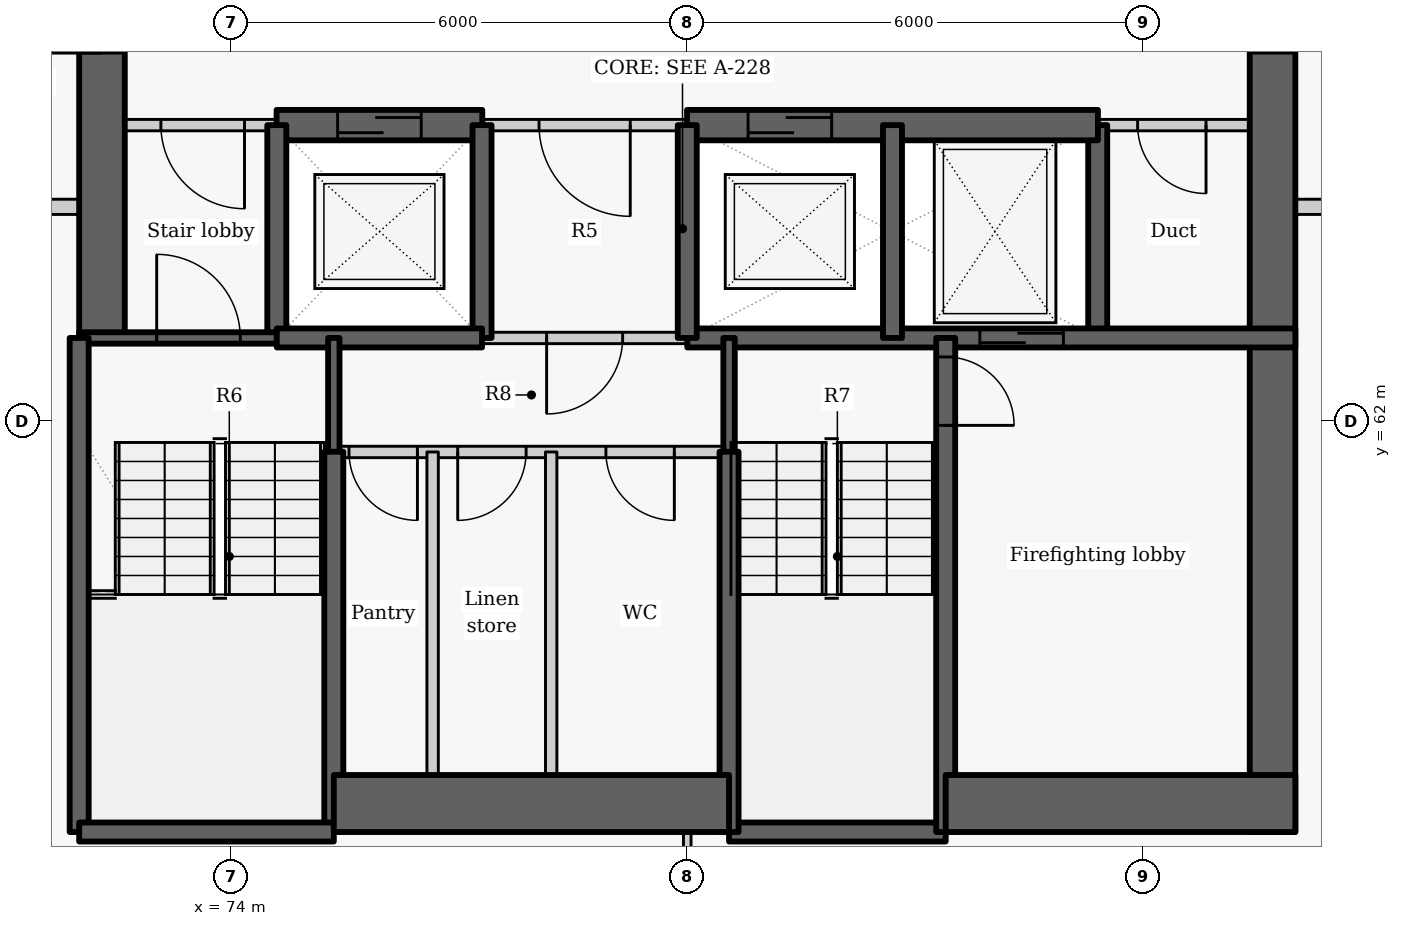
"""IFC4 building model, lengths in metres.
Left out: names, types, materials, properties, quantities, classifications, styles, units other than length and angle.
Written with IfcOpenShell. Run it as: python <this file> out.ifc"""

import sys

from ifc_helpers import new_model, si_unit, direction, frame, frame_2d, origin, place, context, subcontext, project, spatial, rectangle, extrude, element, fill, save


model = new_model("IFC4")
c1 = context("Model", 3, precision=1e-05, world=origin(), true_north=direction((0.0, 1.0)))
c2 = subcontext(c1, "Body", "Model", "MODEL_VIEW")
j1 = project(units=[si_unit("LENGTHUNIT", "METRE"), si_unit("PLANEANGLEUNIT", "RADIAN")], contexts=[c1])
p1 = place(None, origin())
s1 = spatial("IfcSite", under=j1, at=p1, CompositionType="ELEMENT")
p2 = place(p1, origin())
s2 = spatial("IfcBuilding", under=s1, at=p2, CompositionType="ELEMENT")
p3 = place(p2, frame((0.0, 0.0, 160.2)))
s3 = spatial("IfcBuildingStorey", under=s2, at=p3, CompositionType="ELEMENT", Elevation=160.2)
p4 = place(p3, frame((72.3, 63.1, -0.275), z_axis=(0.0, 0.0, 1.0), x_axis=(0.0, 1.0, 0.0)))
e1 = element("IfcWall", 1, at=p4, inside=s3, PredefinedType="SHEAR", context=c2, shape_type="SweptSolid", body=[
    extrude(rectangle(XDim=9.1, YDim=0.6, at=frame_2d((4.55, 0.0))), origin(), (0.0, 0.0, 1.0), 3.3),
])
p5 = place(p4, frame((3.748, 0.0, 0.275)))
e2 = element("IfcOpeningElement", 2, at=p5, cuts=e1, PredefinedType="OPENING", context=c2, shape_type="SweptSolid", body=[
    extrude(rectangle(XDim=1.5, YDim=2.1, at=frame_2d((0.75, 1.05))), frame((0.0, 0.31, 0.0), z_axis=(0.0, -1.0, 0.0), x_axis=(1.0, 0.0, 0.0)), (0.0, 0.0, 1.0), 0.62),
])
p6 = place(p3, frame((85.4, 63.1, -0.275), z_axis=(0.0, 0.0, 1.0), x_axis=(0.0, 1.0, 0.0)))
e3 = element("IfcWall", 3, at=p6, inside=s3, PredefinedType="SHEAR", context=c2, shape_type="SweptSolid", body=[
    extrude(rectangle(XDim=2.8, YDim=0.25, at=frame_2d((1.4, 0.0))), origin(), (0.0, 0.0, 1.0), 3.3),
])
p7 = place(p3, frame((87.7, 72.2, -0.275), z_axis=(0.0, 0.0, 1.0), x_axis=(0.0, -1.0, 0.0)))
e4 = element("IfcWall", 4, at=p7, inside=s3, PredefinedType="SHEAR", context=c2, shape_type="SweptSolid", body=[
    extrude(rectangle(XDim=15.6, YDim=0.6, at=frame_2d((7.8, 0.0))), origin(), (0.0, 0.0, 1.0), 3.3),
])
p8 = place(p7, frame((3.852, 0.0, 0.275)))
e5 = element("IfcOpeningElement", 5, at=p8, cuts=e4, PredefinedType="OPENING", context=c2, shape_type="SweptSolid", body=[
    extrude(rectangle(XDim=1.5, YDim=2.1, at=frame_2d((0.75, 1.05))), frame((0.0, 0.31, 0.0), z_axis=(0.0, -1.0, 0.0), x_axis=(1.0, 0.0, 0.0)), (0.0, 0.0, 1.0), 0.62),
])
p9 = place(p3, frame((74.603, 65.9, 0.0), z_axis=(0.0, 0.0, 1.0), x_axis=(-1.0, 0.0, 0.0)))
e6 = element("IfcWall", 6, at=p9, inside=s3, PredefinedType="PARTITIONING", context=c2, shape_type="SweptSolid", body=[
    extrude(rectangle(XDim=2.603, YDim=0.15, at=frame_2d((1.302, 0.0))), origin(), (0.0, 0.0, 1.0), 3.025),
])
p10 = place(p9, frame((0.428, 0.0, 0.0)))
e7 = element("IfcOpeningElement", 7, at=p10, cuts=e6, PredefinedType="OPENING", context=c2, shape_type="SweptSolid", body=[
    extrude(rectangle(XDim=1.1, YDim=2.1, at=frame_2d((0.55, 1.05))), frame((0.0, 0.085, 0.0), z_axis=(0.0, -1.0, 0.0), x_axis=(1.0, 0.0, 0.0)), (0.0, 0.0, 1.0), 0.17),
])
p11 = place(p3, frame((80.003, 65.9, 0.0), z_axis=(0.0, 0.0, 1.0), x_axis=(-1.0, 0.0, 0.0)))
e8 = element("IfcWall", 8, at=p11, inside=s3, PredefinedType="PARTITIONING", context=c2, shape_type="SweptSolid", body=[
    extrude(rectangle(XDim=2.706, YDim=0.15, at=frame_2d((1.353, 0.0))), origin(), (0.0, 0.0, 1.0), 3.025),
])
p12 = place(p11, frame((0.753, 0.0, 0.0)))
e9 = element("IfcOpeningElement", 9, at=p12, cuts=e8, PredefinedType="OPENING", context=c2, shape_type="SweptSolid", body=[
    extrude(rectangle(XDim=1.2, YDim=2.1, at=frame_2d((0.6, 1.05))), frame((0.0, 0.085, 0.0), z_axis=(0.0, -1.0, 0.0), x_axis=(1.0, 0.0, 0.0)), (0.0, 0.0, 1.0), 0.17),
])
p13 = place(p3, frame((88.0, 65.9, 0.0), z_axis=(0.0, 0.0, 1.0), x_axis=(-1.0, 0.0, 0.0)))
e10 = element("IfcWall", 10, at=p13, inside=s3, PredefinedType="PARTITIONING", context=c2, shape_type="SweptSolid", body=[
    extrude(rectangle(XDim=2.603, YDim=0.15, at=frame_2d((1.302, 0.0))), origin(), (0.0, 0.0, 1.0), 3.025),
])
p14 = place(p13, frame((1.175, 0.0, 0.0)))
e11 = element("IfcOpeningElement", 11, at=p14, cuts=e10, PredefinedType="OPENING", context=c2, shape_type="SweptSolid", body=[
    extrude(rectangle(XDim=0.9, YDim=2.1, at=frame_2d((0.45, 1.05))), frame((0.0, 0.085, 0.0), z_axis=(0.0, -1.0, 0.0), x_axis=(1.0, 0.0, 0.0)), (0.0, 0.0, 1.0), 0.17),
])
p15 = place(p3, frame((74.597, 65.9, -0.275), z_axis=(0.0, 0.0, 1.0), x_axis=(1.0, 0.0, 0.0)))
e12 = element("IfcWall", 12, at=p15, inside=s3, PredefinedType="SHEAR", context=c2, shape_type="SweptSolid", body=[
    extrude(rectangle(XDim=2.706, YDim=0.4, at=frame_2d((1.353, 0.0))), origin(), (0.0, 0.0, 1.0), 3.3),
])
p16 = place(p15, frame((0.803, 0.0, 0.275)))
e13 = element("IfcOpeningElement", 13, at=p16, cuts=e12, PredefinedType="OPENING", context=c2, shape_type="SweptSolid", body=[
    extrude(rectangle(XDim=1.1, YDim=2.1, at=frame_2d((0.55, 1.05))), frame((0.0, 0.21, 0.0), z_axis=(0.0, -1.0, 0.0), x_axis=(1.0, 0.0, 0.0)), (0.0, 0.0, 1.0), 0.42),
])
p17 = place(p3, frame((79.997, 65.9, -0.275), z_axis=(0.0, 0.0, 1.0), x_axis=(1.0, 0.0, 0.0)))
e14 = element("IfcWall", 14, at=p17, inside=s3, PredefinedType="SHEAR", context=c2, shape_type="SweptSolid", body=[
    extrude(rectangle(XDim=5.406, YDim=0.4, at=frame_2d((2.703, 0.0))), origin(), (0.0, 0.0, 1.0), 3.3),
])
p18 = place(p17, frame((0.803, 0.0, 0.275)))
e15 = element("IfcOpeningElement", 15, at=p18, cuts=e14, PredefinedType="OPENING", context=c2, shape_type="SweptSolid", body=[
    extrude(rectangle(XDim=1.1, YDim=2.1, at=frame_2d((0.55, 1.05))), frame((0.0, 0.21, 0.0), z_axis=(0.0, -1.0, 0.0), x_axis=(1.0, 0.0, 0.0)), (0.0, 0.0, 1.0), 0.42),
])
p19 = place(p3, frame((74.6, 63.1, -0.275), z_axis=(0.0, 0.0, 1.0), x_axis=(0.0, 1.0, 0.0)))
e16 = element("IfcWall", 16, at=p19, inside=s3, PredefinedType="SHEAR", context=c2, shape_type="SweptSolid", body=[
    extrude(rectangle(XDim=2.8, YDim=0.25, at=frame_2d((1.4, 0.0))), origin(), (0.0, 0.0, 1.0), 3.3),
])
p20 = place(p3, frame((72.0, 63.1, -0.275), z_axis=(0.0, 0.0, 1.0), x_axis=(1.0, 0.0, 0.0)))
e17 = element("IfcWall", 17, at=p20, inside=s3, PredefinedType="SHEAR", context=c2, shape_type="SweptSolid", body=[
    extrude(rectangle(XDim=2.6, YDim=0.15, at=frame_2d((1.3, 0.0))), origin(), (0.0, 0.0, 1.0), 3.3),
])
p21 = place(p20, frame((1.02, 0.0, 0.275)))
e18 = element("IfcOpeningElement", 18, at=p21, cuts=e17, PredefinedType="OPENING", context=c2, shape_type="SweptSolid", body=[
    extrude(rectangle(XDim=1.1, YDim=2.1, at=frame_2d((0.55, 1.05))), frame((0.0, 0.085, 0.0), z_axis=(0.0, -1.0, 0.0), x_axis=(1.0, 0.0, 0.0)), (0.0, 0.0, 1.0), 0.17),
])
p22 = place(p3, frame((77.3, 63.1, -0.275), z_axis=(0.0, 0.0, 1.0), x_axis=(0.0, 1.0, 0.0)))
e19 = element("IfcWall", 19, at=p22, inside=s3, PredefinedType="SHEAR", context=c2, shape_type="SweptSolid", body=[
    extrude(rectangle(XDim=2.8, YDim=0.25, at=frame_2d((1.4, 0.0))), origin(), (0.0, 0.0, 1.0), 3.3),
])
p23 = place(p3, frame((74.6, 63.1, -0.275), z_axis=(0.0, 0.0, 1.0), x_axis=(1.0, 0.0, 0.0)))
e20 = element("IfcWall", 20, at=p23, inside=s3, PredefinedType="SHEAR", context=c2, shape_type="SweptSolid", body=[
    extrude(rectangle(XDim=2.7, YDim=0.25, at=frame_2d((1.35, 0.0))), origin(), (0.0, 0.0, 1.0), 3.3),
])
p24 = place(p3, frame((80.0, 63.1, -0.275), z_axis=(0.0, 0.0, 1.0), x_axis=(1.0, 0.0, 0.0)))
e21 = element("IfcWall", 21, at=p24, inside=s3, PredefinedType="SHEAR", context=c2, shape_type="SweptSolid", body=[
    extrude(rectangle(XDim=8.0, YDim=0.25, at=frame_2d((4.0, 0.0))), origin(), (0.0, 0.0, 1.0), 3.3),
])
p25 = place(p24, frame((3.849, 0.0, 0.275)))
e22 = element("IfcOpeningElement", 22, at=p25, cuts=e21, PredefinedType="OPENING", context=c2, shape_type="SweptSolid", body=[
    extrude(rectangle(XDim=1.1, YDim=2.1, at=frame_2d((0.55, 1.05))), frame((0.0, 0.135, 0.0), z_axis=(0.0, -1.0, 0.0), x_axis=(1.0, 0.0, 0.0)), (0.0, 0.0, 1.0), 0.27),
])
p26 = place(p3, frame((80.0, 63.1, -0.275), z_axis=(0.0, 0.0, 1.0), x_axis=(0.0, 1.0, 0.0)))
e23 = element("IfcWall", 23, at=p26, inside=s3, PredefinedType="SHEAR", context=c2, shape_type="SweptSolid", body=[
    extrude(rectangle(XDim=2.8, YDim=0.25, at=frame_2d((1.4, 0.0))), origin(), (0.0, 0.0, 1.0), 3.3),
])
p27 = place(p3, frame((80.0, 63.1, 0.0), z_axis=(0.0, 0.0, 1.0), x_axis=(-1.0, 0.0, 0.0)))
e24 = element("IfcWall", 24, at=p27, inside=s3, PredefinedType="PARTITIONING", context=c2, shape_type="SweptSolid", body=[
    extrude(rectangle(XDim=2.7, YDim=0.15, at=frame_2d((1.35, 0.0))), origin(), (0.0, 0.0, 1.0), 3.025),
])
p28 = place(p27, frame((0.85, 0.0, 0.0)))
e25 = element("IfcOpeningElement", 25, at=p28, cuts=e24, PredefinedType="OPENING", context=c2, shape_type="SweptSolid", body=[
    extrude(rectangle(XDim=1.0, YDim=2.1, at=frame_2d((0.5, 1.05))), frame((0.0, 0.085, 0.0), z_axis=(0.0, -1.0, 0.0), x_axis=(1.0, 0.0, 0.0)), (0.0, 0.0, 1.0), 0.17),
])
p29 = place(p3, frame((82.7, 63.1, -0.275), z_axis=(0.0, 0.0, 1.0), x_axis=(0.0, 1.0, 0.0)))
e26 = element("IfcWall", 26, at=p29, inside=s3, PredefinedType="SHEAR", context=c2, shape_type="SweptSolid", body=[
    extrude(rectangle(XDim=2.8, YDim=0.25, at=frame_2d((1.4, 0.0))), origin(), (0.0, 0.0, 1.0), 3.3),
])
p30 = place(p3, frame((75.35, 61.597, -0.275), z_axis=(0.0, 0.0, 1.0), x_axis=(0.0, 1.0, 0.0)))
e27 = element("IfcWall", 27, at=p30, inside=s3, PredefinedType="SHEAR", context=c2, shape_type="SweptSolid", body=[
    extrude(rectangle(XDim=1.503, YDim=0.15, at=frame_2d((0.751, 0.0))), origin(), (0.0, 0.0, 1.0), 3.3),
])
p31 = place(p3, frame((75.35, 56.6, -0.275), z_axis=(0.0, 0.0, 1.0), x_axis=(0.0, 1.0, 0.0)))
e28 = element("IfcWall", 28, at=p31, inside=s3, PredefinedType="SHEAR", context=c2, shape_type="SweptSolid", body=[
    extrude(rectangle(XDim=5.003, YDim=0.25, at=frame_2d((2.501, 0.0))), origin(), (0.0, 0.0, 1.0), 3.3),
])
p32 = place(p3, frame((72.0, 56.6, -0.275), z_axis=(0.0, 0.0, 1.0), x_axis=(0.0, 1.0, 0.0)))
e29 = element("IfcWall", 29, at=p32, inside=s3, PredefinedType="SHEAR", context=c2, shape_type="SweptSolid", body=[
    extrude(rectangle(XDim=6.5, YDim=0.25, at=frame_2d((3.25, 0.0))), origin(), (0.0, 0.0, 1.0), 3.3),
])
p33 = place(p3, frame((72.0, 56.6, -0.275), z_axis=(0.0, 0.0, 1.0), x_axis=(1.0, 0.0, 0.0)))
e30 = element("IfcWall", 30, at=p33, inside=s3, PredefinedType="SHEAR", context=c2, shape_type="SweptSolid", body=[
    extrude(rectangle(XDim=3.35, YDim=0.25, at=frame_2d((1.675, 0.0))), origin(), (0.0, 0.0, 1.0), 3.3),
])
p34 = place(p3, frame((80.55, 56.6, -0.275), z_axis=(0.0, 0.0, 1.0), x_axis=(1.0, 0.0, 0.0)))
e31 = element("IfcWall", 31, at=p34, inside=s3, PredefinedType="SHEAR", context=c2, shape_type="SweptSolid", body=[
    extrude(rectangle(XDim=2.85, YDim=0.25, at=frame_2d((1.425, 0.0))), origin(), (0.0, 0.0, 1.0), 3.3),
])
p35 = place(p3, frame((83.4, 63.1, -0.275), z_axis=(0.0, 0.0, 1.0), x_axis=(0.0, -1.0, 0.0)))
e32 = element("IfcWall", 32, at=p35, inside=s3, PredefinedType="SHEAR", context=c2, shape_type="SweptSolid", body=[
    extrude(rectangle(XDim=6.5, YDim=0.25, at=frame_2d((3.25, 0.0))), origin(), (0.0, 0.0, 1.0), 3.3),
])
p36 = place(p35, frame((0.25, 0.0, 0.275)))
e33 = element("IfcOpeningElement", 33, at=p36, cuts=e32, PredefinedType="OPENING", context=c2, shape_type="SweptSolid", body=[
    extrude(rectangle(XDim=0.9, YDim=2.1, at=frame_2d((0.45, 1.05))), frame((0.0, 0.135, 0.0), z_axis=(0.0, -1.0, 0.0), x_axis=(1.0, 0.0, 0.0)), (0.0, 0.0, 1.0), 0.27),
])
p37 = place(p3, frame((80.55, 61.597, -0.275), z_axis=(0.0, 0.0, 1.0), x_axis=(0.0, 1.0, 0.0)))
e34 = element("IfcWall", 34, at=p37, inside=s3, PredefinedType="SHEAR", context=c2, shape_type="SweptSolid", body=[
    extrude(rectangle(XDim=1.503, YDim=0.15, at=frame_2d((0.751, 0.0))), origin(), (0.0, 0.0, 1.0), 3.3),
])
p38 = place(p3, frame((80.55, 56.6, -0.275), z_axis=(0.0, 0.0, 1.0), x_axis=(0.0, 1.0, 0.0)))
e35 = element("IfcWall", 35, at=p38, inside=s3, PredefinedType="SHEAR", context=c2, shape_type="SweptSolid", body=[
    extrude(rectangle(XDim=5.003, YDim=0.25, at=frame_2d((2.501, 0.0))), origin(), (0.0, 0.0, 1.0), 3.3),
])
p39 = place(p3, frame((75.35, 56.975, -0.275), z_axis=(0.0, 0.0, 1.0), x_axis=(1.0, 0.0, 0.0)))
e36 = element("IfcWall", 36, at=p39, inside=s3, PredefinedType="SHEAR", context=c2, shape_type="SweptSolid", body=[
    extrude(rectangle(XDim=5.2, YDim=0.75, at=frame_2d((2.6, 0.0))), origin(), (0.0, 0.0, 1.0), 3.3),
])
p40 = place(p3, frame((83.4, 56.975, -0.275), z_axis=(0.0, 0.0, 1.0), x_axis=(1.0, 0.0, 0.0)))
e37 = element("IfcWall", 37, at=p40, inside=s3, PredefinedType="SHEAR", context=c2, shape_type="SweptSolid", body=[
    extrude(rectangle(XDim=4.6, YDim=0.75, at=frame_2d((2.3, 0.0))), origin(), (0.0, 0.0, 1.0), 3.3),
])
p41 = place(p3, frame((80.55, 61.6, 0.0), z_axis=(0.0, 0.0, 1.0), x_axis=(-1.0, 0.0, 0.0)))
e38 = element("IfcWall", 38, at=p41, inside=s3, PredefinedType="PARTITIONING", context=c2, shape_type="SweptSolid", body=[
    extrude(rectangle(XDim=5.2, YDim=0.15, at=frame_2d((2.6, 0.0))), origin(), (0.0, 0.0, 1.0), 3.025),
])
p42 = place(p41, frame((4.1, 0.0, 0.0)))
e39 = element("IfcOpeningElement", 39, at=p42, cuts=e38, PredefinedType="OPENING", context=c2, shape_type="SweptSolid", body=[
    extrude(rectangle(XDim=0.9, YDim=2.1, at=frame_2d((0.45, 1.05))), frame((0.0, 0.085, 0.0), z_axis=(0.0, -1.0, 0.0), x_axis=(1.0, 0.0, 0.0)), (0.0, 0.0, 1.0), 0.17),
])
p43 = place(p41, frame((2.67, 0.0, 0.0)))
e40 = element("IfcOpeningElement", 40, at=p43, cuts=e38, PredefinedType="OPENING", context=c2, shape_type="SweptSolid", body=[
    extrude(rectangle(XDim=0.9, YDim=2.1, at=frame_2d((0.45, 1.05))), frame((0.0, 0.085, 0.0), z_axis=(0.0, -1.0, 0.0), x_axis=(1.0, 0.0, 0.0)), (0.0, 0.0, 1.0), 0.17),
])
p44 = place(p41, frame((0.72, 0.0, 0.0)))
e41 = element("IfcOpeningElement", 41, at=p44, cuts=e38, PredefinedType="OPENING", context=c2, shape_type="SweptSolid", body=[
    extrude(rectangle(XDim=0.9, YDim=2.1, at=frame_2d((0.45, 1.05))), frame((0.0, 0.085, 0.0), z_axis=(0.0, -1.0, 0.0), x_axis=(1.0, 0.0, 0.0)), (0.0, 0.0, 1.0), 0.17),
])
for number, where, z_axis, x_axis in (
    (42, (76.65, 56.6, 0.0), (0.0, 0.0, 1.0), (0.0, 1.0, 0.0)),
    (43, (78.21, 56.6, 0.0), (0.0, 0.0, 1.0), (0.0, 1.0, 0.0)),
):
    element("IfcWall", number, at=place(p3, frame(where, z_axis=z_axis, x_axis=x_axis)), inside=s3, PredefinedType="PARTITIONING", context=c2, shape_type="SweptSolid", body=[
        extrude(rectangle(XDim=5.0, YDim=0.15, at=frame_2d((2.5, 0.0))), origin(), (0.0, 0.0, 1.0), 3.025),
    ])
p45 = place(p3, frame((70.577, 64.825, 0.0), z_axis=(0.0, 0.0, 1.0), x_axis=(1.0, 0.0, 0.0)))
e44 = element("IfcWall", 44, at=p45, inside=s3, PredefinedType="PARTITIONING", context=c2, shape_type="SweptSolid", body=[
    extrude(rectangle(XDim=1.423, YDim=0.2, at=frame_2d((0.711, 0.0))), origin(), (0.0, 0.0, 1.0), 3.025),
])
p46 = place(p3, frame((88.0, 64.825, 0.0), z_axis=(0.0, 0.0, 1.0), x_axis=(1.0, 0.0, 0.0)))
e45 = element("IfcWall", 45, at=p46, inside=s3, PredefinedType="PARTITIONING", context=c2, shape_type="SweptSolid", body=[
    extrude(rectangle(XDim=2.463, YDim=0.2, at=frame_2d((1.231, 0.0))), origin(), (0.0, 0.0, 1.0), 2.505),
])
p47 = place(p3, frame((80.0, 56.3, 0.0), z_axis=(0.0, 0.0, 1.0), x_axis=(0.0, 1.0, 0.0)))
e46 = element("IfcWall", 46, at=p47, inside=s3, PredefinedType="PARTITIONING", context=c2, shape_type="SweptSolid", body=[
    extrude(rectangle(XDim=0.3, YDim=0.1, at=frame_2d((0.15, 0.0))), origin(), (0.0, 0.0, 1.0), 3.025),
])
p48 = place(p10, origin())
e47 = element("IfcDoor", 47, at=p48, inside=s3, OperationType="SINGLE_SWING_LEFT", PredefinedType="DOOR", context=c2, shape_type="SweptSolid", body=[
    extrude(rectangle(XDim=1.1, YDim=2.1, at=frame_2d((0.55, 1.05))), frame((0.0, 0.025, 0.0), z_axis=(0.0, -1.0, 0.0), x_axis=(1.0, 0.0, 0.0)), (0.0, 0.0, 1.0), 0.05),
])
fill(e7, e47)
p49 = place(p16, origin())
e48 = element("IfcDoor", 48, at=p49, inside=s3, OperationType="SLIDING_TO_LEFT", PredefinedType="DOOR", context=c2, shape_type="SweptSolid", body=[
    extrude(rectangle(XDim=1.1, YDim=2.1, at=frame_2d((0.55, 1.05))), frame((0.0, 0.025, 0.0), z_axis=(0.0, -1.0, 0.0), x_axis=(1.0, 0.0, 0.0)), (0.0, 0.0, 1.0), 0.05),
])
fill(e13, e48)
p50 = place(p12, origin())
e49 = element("IfcDoor", 49, at=p50, inside=s3, OperationType="DOUBLE_DOOR_SINGLE_SWING", PredefinedType="DOOR", context=c2, shape_type="SweptSolid", body=[
    extrude(rectangle(XDim=1.2, YDim=2.1, at=frame_2d((0.6, 1.05))), frame((0.0, 0.025, 0.0), z_axis=(0.0, -1.0, 0.0), x_axis=(1.0, 0.0, 0.0)), (0.0, 0.0, 1.0), 0.05),
])
fill(e9, e49)
p51 = place(p18, origin())
e50 = element("IfcDoor", 50, at=p51, inside=s3, OperationType="SLIDING_TO_LEFT", PredefinedType="DOOR", context=c2, shape_type="SweptSolid", body=[
    extrude(rectangle(XDim=1.1, YDim=2.1, at=frame_2d((0.55, 1.05))), frame((0.0, 0.025, 0.0), z_axis=(0.0, -1.0, 0.0), x_axis=(1.0, 0.0, 0.0)), (0.0, 0.0, 1.0), 0.05),
])
fill(e15, e50)
p52 = place(p25, origin())
e51 = element("IfcDoor", 51, at=p52, inside=s3, OperationType="SLIDING_TO_LEFT", PredefinedType="DOOR", context=c2, shape_type="SweptSolid", body=[
    extrude(rectangle(XDim=1.1, YDim=2.1, at=frame_2d((0.55, 1.05))), frame((0.0, 0.025, 0.0), z_axis=(0.0, -1.0, 0.0), x_axis=(1.0, 0.0, 0.0)), (0.0, 0.0, 1.0), 0.05),
])
fill(e22, e51)
p53 = place(p14, origin())
e52 = element("IfcDoor", 52, at=p53, inside=s3, OperationType="SINGLE_SWING_LEFT", PredefinedType="DOOR", context=c2, shape_type="SweptSolid", body=[
    extrude(rectangle(XDim=0.9, YDim=2.1, at=frame_2d((0.45, 1.05))), frame((0.0, 0.025, 0.0), z_axis=(0.0, -1.0, 0.0), x_axis=(1.0, 0.0, 0.0)), (0.0, 0.0, 1.0), 0.05),
])
fill(e11, e52)
p54 = place(p28, origin())
e53 = element("IfcDoor", 53, at=p54, inside=s3, OperationType="SINGLE_SWING_RIGHT", PredefinedType="DOOR", context=c2, shape_type="SweptSolid", body=[
    extrude(rectangle(XDim=1.0, YDim=2.1, at=frame_2d((0.5, 1.05))), frame((0.0, 0.025, 0.0), z_axis=(0.0, -1.0, 0.0), x_axis=(1.0, 0.0, 0.0)), (0.0, 0.0, 1.0), 0.05),
])
fill(e25, e53)
p55 = place(p42, origin())
e54 = element("IfcDoor", 54, at=p55, inside=s3, OperationType="SINGLE_SWING_LEFT", PredefinedType="DOOR", context=c2, shape_type="SweptSolid", body=[
    extrude(rectangle(XDim=0.9, YDim=2.1, at=frame_2d((0.45, 1.05))), frame((0.0, 0.025, 0.0), z_axis=(0.0, -1.0, 0.0), x_axis=(1.0, 0.0, 0.0)), (0.0, 0.0, 1.0), 0.05),
])
fill(e39, e54)
p56 = place(p43, origin())
e55 = element("IfcDoor", 55, at=p56, inside=s3, OperationType="SINGLE_SWING_RIGHT", PredefinedType="DOOR", context=c2, shape_type="SweptSolid", body=[
    extrude(rectangle(XDim=0.9, YDim=2.1, at=frame_2d((0.45, 1.05))), frame((0.0, 0.025, 0.0), z_axis=(0.0, -1.0, 0.0), x_axis=(1.0, 0.0, 0.0)), (0.0, 0.0, 1.0), 0.05),
])
fill(e40, e55)
p57 = place(p44, origin())
e56 = element("IfcDoor", 56, at=p57, inside=s3, OperationType="SINGLE_SWING_LEFT", PredefinedType="DOOR", context=c2, shape_type="SweptSolid", body=[
    extrude(rectangle(XDim=0.9, YDim=2.1, at=frame_2d((0.45, 1.05))), frame((0.0, 0.025, 0.0), z_axis=(0.0, -1.0, 0.0), x_axis=(1.0, 0.0, 0.0)), (0.0, 0.0, 1.0), 0.05),
])
fill(e41, e56)
p58 = place(p21, origin())
e57 = element("IfcDoor", 57, at=p58, inside=s3, OperationType="SINGLE_SWING_LEFT", PredefinedType="DOOR", context=c2, shape_type="SweptSolid", body=[
    extrude(rectangle(XDim=1.1, YDim=2.1, at=frame_2d((0.55, 1.05))), frame((0.0, 0.025, 0.0), z_axis=(0.0, -1.0, 0.0), x_axis=(1.0, 0.0, 0.0)), (0.0, 0.0, 1.0), 0.05),
])
fill(e18, e57)
p59 = place(p36, origin())
e58 = element("IfcDoor", 58, at=p59, inside=s3, OperationType="SINGLE_SWING_RIGHT", PredefinedType="DOOR", context=c2, shape_type="SweptSolid", body=[
    extrude(rectangle(XDim=0.9, YDim=2.1, at=frame_2d((0.45, 1.05))), frame((0.0, 0.025, 0.0), z_axis=(0.0, -1.0, 0.0), x_axis=(1.0, 0.0, 0.0)), (0.0, 0.0, 1.0), 0.05),
])
fill(e33, e58)
p60 = place(p8, origin())
e59 = element("IfcDoor", 59, at=p60, inside=s3, OperationType="DOUBLE_DOOR_SINGLE_SWING", PredefinedType="DOOR", context=c2, shape_type="SweptSolid", body=[
    extrude(rectangle(XDim=1.5, YDim=2.1, at=frame_2d((0.75, 1.05))), frame((0.0, 0.025, 0.0), z_axis=(0.0, -1.0, 0.0), x_axis=(1.0, 0.0, 0.0)), (0.0, 0.0, 1.0), 0.05),
])
fill(e5, e59)
p61 = place(p5, origin())
e60 = element("IfcDoor", 60, at=p61, inside=s3, OperationType="DOUBLE_DOOR_SINGLE_SWING", PredefinedType="DOOR", context=c2, shape_type="SweptSolid", body=[
    extrude(rectangle(XDim=1.5, YDim=2.1, at=frame_2d((0.75, 1.05))), frame((0.0, 0.025, 0.0), z_axis=(0.0, -1.0, 0.0), x_axis=(1.0, 0.0, 0.0)), (0.0, 0.0, 1.0), 0.05),
])
fill(e2, e60)
save(model, sys.argv[1])
